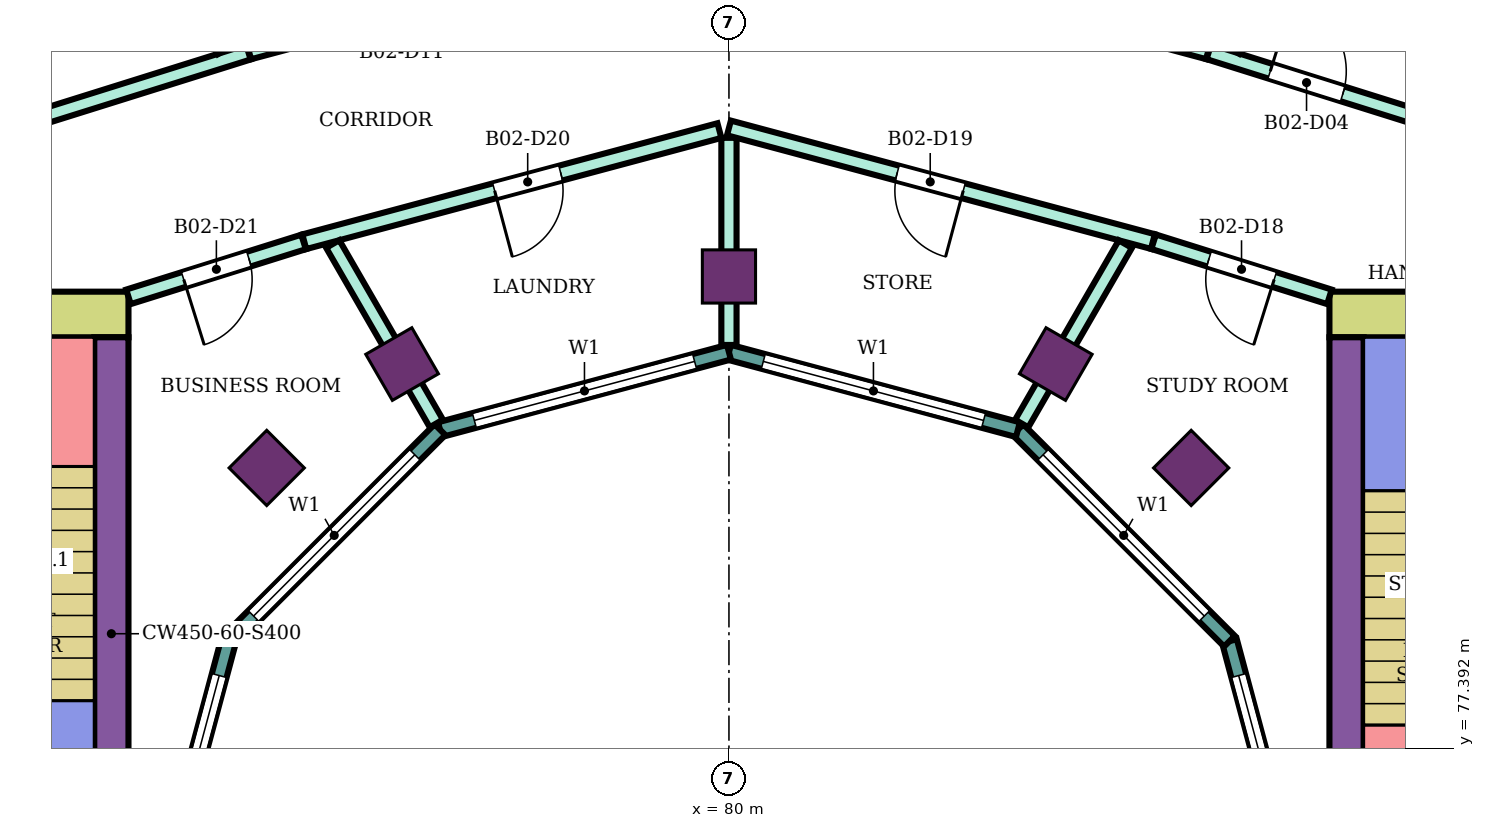
"""IFC4 building model, lengths in metres.
Left out: names, types, materials, properties, quantities, classifications, styles, units other than length and angle.
Written with IfcOpenShell. Run it as: python <this file> out.ifc"""

import sys

from ifc_helpers import new_model, si_unit, direction, frame, frame_2d, origin, origin_2d, place, context, subcontext, project, spatial, rectangle, extrude, element, fill, save


model = new_model("IFC4")
c1 = context("Model", 3, precision=1e-05, world=origin(), true_north=direction((0.0, 1.0)))
c2 = subcontext(c1, "Body", "Model", "MODEL_VIEW")
j1 = project(units=[si_unit("LENGTHUNIT", "METRE"), si_unit("PLANEANGLEUNIT", "RADIAN")], contexts=[c1])
p1 = place(None, origin())
s1 = spatial("IfcSite", under=j1, at=p1, CompositionType="ELEMENT")
p2 = place(p1, origin())
s2 = spatial("IfcBuilding", under=s1, at=p2, CompositionType="ELEMENT")
p3 = place(p2, frame((0.0, 0.0, 225.1)))
s3 = spatial("IfcBuildingStorey", under=s2, at=p3, CompositionType="ELEMENT", Elevation=225.1)
for number, where, z_axis, x_axis in (
    (1, (86.081, 81.081, 0.0), (0.0, 0.0, 1.0), (0.707, 0.707, 0.0)),
    (2, (84.3, 82.448, 0.0), (0.0, 0.0, 1.0), (0.5, 0.866, 0.0)),
    (3, (80.0, 83.6, 0.0), (0.0, 0.0, 1.0), (0.0, 1.0, 0.0)),
    (4, (75.7, 82.448, 0.0), (0.0, 0.0, 1.0), (-0.5, 0.866, 0.0)),
    (5, (73.919, 81.081, 0.0), (0.0, 0.0, 1.0), (-0.707, 0.707, 0.0)),
):
    element("IfcColumn", number, at=place(p3, frame(where, z_axis=z_axis, x_axis=x_axis)), inside=s3, PredefinedType="COLUMN", context=c2, shape_type="SweptSolid", body=[
        extrude(rectangle(XDim=0.7, YDim=0.7, at=origin_2d()), origin(), (0.0, 0.0, 1.0), 4.2),
    ])
p4 = place(p3, frame((87.9, 83.1, 0.0), z_axis=(0.0, 0.0, 1.0), x_axis=(1.0, 0.0, 0.0)))
e6 = element("IfcWall", 6, at=p4, inside=s3, PredefinedType="SHEAR", context=c2, shape_type="SweptSolid", body=[
    extrude(rectangle(XDim=14.9, YDim=0.6, at=frame_2d((7.45, 0.0))), origin(), (0.0, 0.0, 1.0), 3.8),
])
p5 = place(p4, frame((4.2, 0.0, 0.0)))
e7 = element("IfcOpeningElement", 7, at=p5, cuts=e6, PredefinedType="OPENING", context=c2, shape_type="SweptSolid", body=[
    extrude(rectangle(XDim=2.4, YDim=2.4, at=frame_2d((1.2, 1.2))), frame((0.0, 0.31, 0.0), z_axis=(0.0, -1.0, 0.0), x_axis=(1.0, 0.0, 0.0)), (0.0, 0.0, 1.0), 0.62),
])
p6 = place(p3, frame((88.125, 75.0, 0.0), z_axis=(0.0, 0.0, 1.0), x_axis=(0.0, 1.0, 0.0)))
e8 = element("IfcWall", 8, at=p6, inside=s3, PredefinedType="SHEAR", context=c2, shape_type="SweptSolid", body=[
    extrude(rectangle(XDim=7.8, YDim=0.45, at=frame_2d((3.9, 0.0))), origin(), (0.0, 0.0, 1.0), 3.8),
])
p7 = place(p3, frame((72.1, 83.1, 0.0), z_axis=(0.0, 0.0, 1.0), x_axis=(-1.0, 0.0, 0.0)))
e9 = element("IfcWall", 9, at=p7, inside=s3, PredefinedType="SHEAR", context=c2, shape_type="SweptSolid", body=[
    extrude(rectangle(XDim=14.9, YDim=0.6, at=frame_2d((7.45, 0.0))), origin(), (0.0, 0.0, 1.0), 3.8),
])
p8 = place(p7, frame((4.2, 0.0, 0.0)))
e10 = element("IfcOpeningElement", 10, at=p8, cuts=e9, PredefinedType="OPENING", context=c2, shape_type="SweptSolid", body=[
    extrude(rectangle(XDim=2.4, YDim=2.4, at=frame_2d((1.2, 1.2))), frame((0.0, 0.31, 0.0), z_axis=(0.0, -1.0, 0.0), x_axis=(1.0, 0.0, 0.0)), (0.0, 0.0, 1.0), 0.62),
])
p9 = place(p3, frame((71.875, 82.8, 0.0), z_axis=(0.0, 0.0, 1.0), x_axis=(0.0, -1.0, 0.0)))
e11 = element("IfcWall", 11, at=p9, inside=s3, PredefinedType="SHEAR", context=c2, shape_type="SweptSolid", body=[
    extrude(rectangle(XDim=7.8, YDim=0.45, at=frame_2d((3.9, 0.0))), origin(), (0.0, 0.0, 1.0), 3.8),
])
p10 = place(p3, frame((87.604, 75.0, 0.0), z_axis=(0.0, 0.0, 1.0), x_axis=(-0.258789828301, 0.965933654434, 0.0)))
e12 = element("IfcWall", 12, at=p10, inside=s3, PredefinedType="NOTDEFINED", context=c2, shape_type="SweptSolid", body=[
    extrude(rectangle(XDim=3.936, YDim=0.2, at=frame_2d((1.968, 0.0))), origin(), (0.0, 0.0, 1.0), 4.2),
])
p11 = place(p10, frame((0.468, 0.0, 0.9)))
e13 = element("IfcOpeningElement", 13, at=p11, cuts=e12, PredefinedType="OPENING", context=c2, shape_type="SweptSolid", body=[
    extrude(rectangle(XDim=3.0, YDim=2.3, at=frame_2d((1.5, 1.15))), frame((0.0, 0.11, 0.0), z_axis=(0.0, -1.0, 0.0), x_axis=(1.0, 0.0, 0.0)), (0.0, 0.0, 1.0), 0.22),
])
p12 = place(p3, frame((86.585, 78.802, 0.0), z_axis=(0.0, 0.0, 1.0), x_axis=(-0.707106781187, 0.707106781187, 0.0)))
e14 = element("IfcWall", 14, at=p12, inside=s3, PredefinedType="NOTDEFINED", context=c2, shape_type="SweptSolid", body=[
    extrude(rectangle(XDim=3.936, YDim=0.2, at=frame_2d((1.968, 0.0))), origin(), (0.0, 0.0, 1.0), 4.2),
])
p13 = place(p12, frame((0.468, 0.0, 0.9)))
e15 = element("IfcOpeningElement", 15, at=p13, cuts=e14, PredefinedType="OPENING", context=c2, shape_type="SweptSolid", body=[
    extrude(rectangle(XDim=3.0, YDim=2.3, at=frame_2d((1.5, 1.15))), frame((0.0, 0.11, 0.0), z_axis=(0.0, -1.0, 0.0), x_axis=(1.0, 0.0, 0.0)), (0.0, 0.0, 1.0), 0.22),
])
p14 = place(p3, frame((83.802, 81.585, 0.0), z_axis=(0.0, 0.0, 1.0), x_axis=(-0.965933654434, 0.258789828301, 0.0)))
e16 = element("IfcWall", 16, at=p14, inside=s3, PredefinedType="NOTDEFINED", context=c2, shape_type="SweptSolid", body=[
    extrude(rectangle(XDim=3.936, YDim=0.2, at=frame_2d((1.968, 0.0))), origin(), (0.0, 0.0, 1.0), 4.2),
])
p15 = place(p14, frame((0.468, 0.0, 0.9)))
e17 = element("IfcOpeningElement", 17, at=p15, cuts=e16, PredefinedType="OPENING", context=c2, shape_type="SweptSolid", body=[
    extrude(rectangle(XDim=3.0, YDim=2.3, at=frame_2d((1.5, 1.15))), frame((0.0, 0.11, 0.0), z_axis=(0.0, -1.0, 0.0), x_axis=(1.0, 0.0, 0.0)), (0.0, 0.0, 1.0), 0.22),
])
p16 = place(p3, frame((80.0, 82.604, 0.0), z_axis=(0.0, 0.0, 1.0), x_axis=(-0.965933654434, -0.258789828301, 0.0)))
e18 = element("IfcWall", 18, at=p16, inside=s3, PredefinedType="NOTDEFINED", context=c2, shape_type="SweptSolid", body=[
    extrude(rectangle(XDim=3.936, YDim=0.2, at=frame_2d((1.968, 0.0))), origin(), (0.0, 0.0, 1.0), 4.2),
])
p17 = place(p16, frame((0.468, 0.0, 0.9)))
e19 = element("IfcOpeningElement", 19, at=p17, cuts=e18, PredefinedType="OPENING", context=c2, shape_type="SweptSolid", body=[
    extrude(rectangle(XDim=3.0, YDim=2.3, at=frame_2d((1.5, 1.15))), frame((0.0, 0.11, 0.0), z_axis=(0.0, -1.0, 0.0), x_axis=(1.0, 0.0, 0.0)), (0.0, 0.0, 1.0), 0.22),
])
p18 = place(p3, frame((76.198, 81.585, 0.0), z_axis=(0.0, 0.0, 1.0), x_axis=(-0.707106781187, -0.707106781187, 0.0)))
e20 = element("IfcWall", 20, at=p18, inside=s3, PredefinedType="NOTDEFINED", context=c2, shape_type="SweptSolid", body=[
    extrude(rectangle(XDim=3.936, YDim=0.2, at=frame_2d((1.968, 0.0))), origin(), (0.0, 0.0, 1.0), 4.2),
])
p19 = place(p18, frame((0.468, 0.0, 0.9)))
e21 = element("IfcOpeningElement", 21, at=p19, cuts=e20, PredefinedType="OPENING", context=c2, shape_type="SweptSolid", body=[
    extrude(rectangle(XDim=3.0, YDim=2.3, at=frame_2d((1.5, 1.15))), frame((0.0, 0.11, 0.0), z_axis=(0.0, -1.0, 0.0), x_axis=(1.0, 0.0, 0.0)), (0.0, 0.0, 1.0), 0.22),
])
p20 = place(p3, frame((73.415, 78.802, 0.0), z_axis=(0.0, 0.0, 1.0), x_axis=(-0.258789828301, -0.965933654434, 0.0)))
e22 = element("IfcWall", 22, at=p20, inside=s3, PredefinedType="NOTDEFINED", context=c2, shape_type="SweptSolid", body=[
    extrude(rectangle(XDim=3.936, YDim=0.2, at=frame_2d((1.968, 0.0))), origin(), (0.0, 0.0, 1.0), 4.2),
])
p21 = place(p20, frame((0.468, 0.0, 0.9)))
e23 = element("IfcOpeningElement", 23, at=p21, cuts=e22, PredefinedType="OPENING", context=c2, shape_type="SweptSolid", body=[
    extrude(rectangle(XDim=3.0, YDim=2.3, at=frame_2d((1.5, 1.15))), frame((0.0, 0.11, 0.0), z_axis=(0.0, -1.0, 0.0), x_axis=(1.0, 0.0, 0.0)), (0.0, 0.0, 1.0), 0.22),
])
p22 = place(p3, frame((68.2, 84.834, 0.0), z_axis=(0.0, 0.0, 1.0), x_axis=(0.954260265251, 0.298977166624, 0.0)))
e24 = element("IfcWall", 24, at=p22, inside=s3, PredefinedType="PARTITIONING", context=c2, shape_type="SweptSolid", body=[
    extrude(rectangle(XDim=5.741, YDim=0.2, at=frame_2d((2.87, 0.0))), origin(), (0.0, 0.0, 1.0), 3.75),
])
p23 = place(p3, frame((72.1, 83.332, 0.0), z_axis=(0.0, 0.0, 1.0), x_axis=(0.954233106619, 0.299063836383, 0.0)))
e25 = element("IfcWall", 25, at=p23, inside=s3, PredefinedType="PARTITIONING", context=c2, shape_type="SweptSolid", body=[
    extrude(rectangle(XDim=2.414, YDim=0.2, at=frame_2d((1.207, 0.0))), origin(), (0.0, 0.0, 1.0), 3.75),
])
p24 = place(p23, frame((0.762, 0.0, 0.0)))
e26 = element("IfcOpeningElement", 26, at=p24, cuts=e25, PredefinedType="OPENING", context=c2, shape_type="SweptSolid", body=[
    extrude(rectangle(XDim=0.9, YDim=2.1, at=frame_2d((0.45, 1.05))), frame((0.0, 0.11, 0.0), z_axis=(0.0, -1.0, 0.0), x_axis=(1.0, 0.0, 0.0)), (0.0, 0.0, 1.0), 0.22),
])
p25 = place(p3, frame((73.687, 86.554, 0.0), z_axis=(0.0, 0.0, 1.0), x_axis=(0.96595258731, 0.258719150952, 0.0)))
e27 = element("IfcWall", 27, at=p25, inside=s3, PredefinedType="PARTITIONING", context=c2, shape_type="SweptSolid", body=[
    extrude(rectangle(XDim=6.486, YDim=0.2, at=frame_2d((3.243, 0.0))), origin(), (0.0, 0.0, 1.0), 3.75),
])
p26 = place(p25, frame((1.578, 0.0, 0.0)))
e28 = element("IfcOpeningElement", 28, at=p26, cuts=e27, PredefinedType="OPENING", context=c2, shape_type="SweptSolid", body=[
    extrude(rectangle(XDim=1.0, YDim=2.1, at=frame_2d((0.5, 1.05))), frame((0.0, 0.11, 0.0), z_axis=(0.0, -1.0, 0.0), x_axis=(1.0, 0.0, 0.0)), (0.0, 0.0, 1.0), 0.22),
])
p27 = place(p3, frame((74.413, 84.057, 0.0), z_axis=(0.0, 0.0, 1.0), x_axis=(0.965972135939, 0.258646153246, 0.0)))
e29 = element("IfcWall", 29, at=p27, inside=s3, PredefinedType="PARTITIONING", context=c2, shape_type="SweptSolid", body=[
    extrude(rectangle(XDim=5.654, YDim=0.2, at=frame_2d((2.827, 0.0))), origin(), (0.0, 0.0, 1.0), 3.75),
])
p28 = place(p27, frame((2.593, 0.0, 0.0)))
e30 = element("IfcOpeningElement", 30, at=p28, cuts=e29, PredefinedType="OPENING", context=c2, shape_type="SweptSolid", body=[
    extrude(rectangle(XDim=0.9, YDim=2.1, at=frame_2d((0.45, 1.05))), frame((0.0, 0.11, 0.0), z_axis=(0.0, -1.0, 0.0), x_axis=(1.0, 0.0, 0.0)), (0.0, 0.0, 1.0), 0.22),
])
p29 = place(p3, frame((74.787, 84.027, 0.0), z_axis=(0.0, 0.0, 1.0), x_axis=(0.500079107518, -0.86597972622, 0.0)))
e31 = element("IfcWall", 31, at=p29, inside=s3, PredefinedType="PARTITIONING", context=c2, shape_type="SweptSolid", body=[
    extrude(rectangle(XDim=2.726, YDim=0.2, at=frame_2d((1.363, 0.0))), origin(), (0.0, 0.0, 1.0), 3.75),
])
p30 = place(p3, frame((80.0, 82.699, 0.0), z_axis=(0.0, 0.0, 1.0), x_axis=(0.0, 1.0, 0.0)))
e32 = element("IfcWall", 32, at=p30, inside=s3, PredefinedType="PARTITIONING", context=c2, shape_type="SweptSolid", body=[
    extrude(rectangle(XDim=2.725, YDim=0.2, at=frame_2d((1.363, 0.0))), origin(), (0.0, 0.0, 1.0), 3.75),
])
p31 = place(p3, frame((80.0, 85.554, 0.0), z_axis=(0.0, 0.0, 1.0), x_axis=(0.965928989968, -0.258807237802, 0.0)))
e33 = element("IfcWall", 33, at=p31, inside=s3, PredefinedType="PARTITIONING", context=c2, shape_type="SweptSolid", body=[
    extrude(rectangle(XDim=5.774, YDim=0.2, at=frame_2d((2.887, 0.0))), origin(), (0.0, 0.0, 1.0), 3.75),
])
p32 = place(p31, frame((2.292, 0.0, 0.0)))
e34 = element("IfcOpeningElement", 34, at=p32, cuts=e33, PredefinedType="OPENING", context=c2, shape_type="SweptSolid", body=[
    extrude(rectangle(XDim=0.9, YDim=2.1, at=frame_2d((0.45, 1.05))), frame((0.0, 0.11, 0.0), z_axis=(0.0, -1.0, 0.0), x_axis=(1.0, 0.0, 0.0)), (0.0, 0.0, 1.0), 0.22),
])
p33 = place(p3, frame((80.048, 88.233, 0.0), z_axis=(0.0, 0.0, 1.0), x_axis=(0.965865387308, -0.259044501198, 0.0)))
e35 = element("IfcWall", 35, at=p33, inside=s3, PredefinedType="PARTITIONING", context=c2, shape_type="SweptSolid", body=[
    extrude(rectangle(XDim=6.476, YDim=0.2, at=frame_2d((3.238, 0.0))), origin(), (0.0, 0.0, 1.0), 3.75),
])
p34 = place(p33, frame((0.5, 0.0, 0.0)))
e36 = element("IfcOpeningElement", 36, at=p34, cuts=e35, PredefinedType="OPENING", context=c2, shape_type="SweptSolid", body=[
    extrude(rectangle(XDim=1.0, YDim=2.1, at=frame_2d((0.5, 1.05))), frame((0.0, 0.11, 0.0), z_axis=(0.0, -1.0, 0.0), x_axis=(1.0, 0.0, 0.0)), (0.0, 0.0, 1.0), 0.22),
])
p35 = place(p3, frame((83.852, 81.665, 0.0), z_axis=(0.0, 0.0, 1.0), x_axis=(0.500146274735, 0.865940935554, 0.0)))
e37 = element("IfcWall", 37, at=p35, inside=s3, PredefinedType="PARTITIONING", context=c2, shape_type="SweptSolid", body=[
    extrude(rectangle(XDim=2.726, YDim=0.2, at=frame_2d((1.363, 0.0))), origin(), (0.0, 0.0, 1.0), 3.75),
])
p36 = place(p3, frame((85.587, 84.057, 0.0), z_axis=(0.0, 0.0, 1.0), x_axis=(0.954239513179, -0.299043393987, 0.0)))
e38 = element("IfcWall", 38, at=p36, inside=s3, PredefinedType="PARTITIONING", context=c2, shape_type="SweptSolid", body=[
    extrude(rectangle(XDim=2.424, YDim=0.2, at=frame_2d((1.212, 0.0))), origin(), (0.0, 0.0, 1.0), 3.75),
])
p37 = place(p36, frame((0.762, 0.0, 0.0)))
e39 = element("IfcOpeningElement", 39, at=p37, cuts=e38, PredefinedType="OPENING", context=c2, shape_type="SweptSolid", body=[
    extrude(rectangle(XDim=0.9, YDim=2.1, at=frame_2d((0.45, 1.05))), frame((0.0, 0.11, 0.0), z_axis=(0.0, -1.0, 0.0), x_axis=(1.0, 0.0, 0.0)), (0.0, 0.0, 1.0), 0.22),
])
p38 = place(p3, frame((86.313, 86.554, 0.0), z_axis=(0.0, 0.0, 1.0), x_axis=(0.954081217458, -0.299548043717, 0.0)))
e40 = element("IfcWall", 40, at=p38, inside=s3, PredefinedType="PARTITIONING", context=c2, shape_type="SweptSolid", body=[
    extrude(rectangle(XDim=5.721, YDim=0.2, at=frame_2d((2.86, 0.0))), origin(), (0.0, 0.0, 1.0), 3.75),
])
p39 = place(p38, frame((0.848, 0.0, 0.0)))
e41 = element("IfcOpeningElement", 41, at=p39, cuts=e40, PredefinedType="OPENING", context=c2, shape_type="SweptSolid", body=[
    extrude(rectangle(XDim=1.0, YDim=2.1, at=frame_2d((0.5, 1.05))), frame((0.0, 0.11, 0.0), z_axis=(0.0, -1.0, 0.0), x_axis=(1.0, 0.0, 0.0)), (0.0, 0.0, 1.0), 0.22),
])
p40 = place(p3, frame((67.109, 97.346, 0.0), z_axis=(0.0, 0.0, 1.0), x_axis=(0.498583439824, -0.866841711925, 0.0)))
e42 = element("IfcWall", 42, at=p40, inside=s3, PredefinedType="PARTITIONING", context=c2, shape_type="SweptSolid", body=[
    extrude(rectangle(XDim=12.456, YDim=0.1, at=frame_2d((6.228, 0.0))), origin(), (0.0, 0.0, 1.0), 3.75),
])
p41 = place(p40, frame((2.538, 0.0, 0.0)))
e43 = element("IfcOpeningElement", 43, at=p41, cuts=e42, PredefinedType="OPENING", context=c2, shape_type="SweptSolid", body=[
    extrude(rectangle(XDim=0.9, YDim=2.1, at=frame_2d((0.45, 1.05))), frame((0.0, 0.06, 0.0), z_axis=(0.0, -1.0, 0.0), x_axis=(1.0, 0.0, 0.0)), (0.0, 0.0, 1.0), 0.12),
])
p42 = place(p40, frame((9.85, 0.0, 0.0)))
e44 = element("IfcOpeningElement", 44, at=p42, cuts=e42, PredefinedType="OPENING", context=c2, shape_type="SweptSolid", body=[
    extrude(rectangle(XDim=0.8, YDim=2.1, at=frame_2d((0.4, 1.05))), frame((0.0, 0.06, 0.0), z_axis=(0.0, -1.0, 0.0), x_axis=(1.0, 0.0, 0.0)), (0.0, 0.0, 1.0), 0.12),
])
p43 = place(p3, frame((86.671, 86.554, 0.0), z_axis=(0.0, 0.0, 1.0), x_axis=(0.500104188531, 0.865965242151, 0.0)))
e45 = element("IfcWall", 45, at=p43, inside=s3, PredefinedType="PARTITIONING", context=c2, shape_type="SweptSolid", body=[
    extrude(rectangle(XDim=12.456, YDim=0.1, at=frame_2d((6.228, 0.0))), origin(), (0.0, 0.0, 1.0), 3.75),
])
p44 = place(p43, frame((9.111, 0.0, 0.0)))
e46 = element("IfcOpeningElement", 46, at=p44, cuts=e45, PredefinedType="OPENING", context=c2, shape_type="SweptSolid", body=[
    extrude(rectangle(XDim=0.9, YDim=2.1, at=frame_2d((0.45, 1.05))), frame((0.0, 0.06, 0.0), z_axis=(0.0, -1.0, 0.0), x_axis=(1.0, 0.0, 0.0)), (0.0, 0.0, 1.0), 0.12),
])
p45 = place(p43, frame((2.462, 0.0, 0.0)))
e47 = element("IfcOpeningElement", 47, at=p45, cuts=e45, PredefinedType="OPENING", context=c2, shape_type="SweptSolid", body=[
    extrude(rectangle(XDim=0.8, YDim=2.1, at=frame_2d((0.4, 1.05))), frame((0.0, 0.06, 0.0), z_axis=(0.0, -1.0, 0.0), x_axis=(1.0, 0.0, 0.0)), (0.0, 0.0, 1.0), 0.12),
])
p46 = place(p11, origin())
e48 = element("IfcWindow", 48, at=p46, inside=s3, PartitioningType="SINGLE_PANEL", PredefinedType="WINDOW", context=c2, shape_type="SweptSolid", body=[
    extrude(rectangle(XDim=3.0, YDim=2.3, at=frame_2d((1.5, 1.15))), frame((0.0, 0.03, 0.0), z_axis=(0.0, -1.0, 0.0), x_axis=(1.0, 0.0, 0.0)), (0.0, 0.0, 1.0), 0.06),
])
fill(e13, e48)
p47 = place(p13, origin())
e49 = element("IfcWindow", 49, at=p47, inside=s3, PartitioningType="SINGLE_PANEL", PredefinedType="WINDOW", context=c2, shape_type="SweptSolid", body=[
    extrude(rectangle(XDim=3.0, YDim=2.3, at=frame_2d((1.5, 1.15))), frame((0.0, 0.03, 0.0), z_axis=(0.0, -1.0, 0.0), x_axis=(1.0, 0.0, 0.0)), (0.0, 0.0, 1.0), 0.06),
])
fill(e15, e49)
p48 = place(p15, origin())
e50 = element("IfcWindow", 50, at=p48, inside=s3, PartitioningType="SINGLE_PANEL", PredefinedType="WINDOW", context=c2, shape_type="SweptSolid", body=[
    extrude(rectangle(XDim=3.0, YDim=2.3, at=frame_2d((1.5, 1.15))), frame((0.0, 0.03, 0.0), z_axis=(0.0, -1.0, 0.0), x_axis=(1.0, 0.0, 0.0)), (0.0, 0.0, 1.0), 0.06),
])
fill(e17, e50)
p49 = place(p17, origin())
e51 = element("IfcWindow", 51, at=p49, inside=s3, PartitioningType="SINGLE_PANEL", PredefinedType="WINDOW", context=c2, shape_type="SweptSolid", body=[
    extrude(rectangle(XDim=3.0, YDim=2.3, at=frame_2d((1.5, 1.15))), frame((0.0, 0.03, 0.0), z_axis=(0.0, -1.0, 0.0), x_axis=(1.0, 0.0, 0.0)), (0.0, 0.0, 1.0), 0.06),
])
fill(e19, e51)
p50 = place(p19, origin())
e52 = element("IfcWindow", 52, at=p50, inside=s3, PartitioningType="SINGLE_PANEL", PredefinedType="WINDOW", context=c2, shape_type="SweptSolid", body=[
    extrude(rectangle(XDim=3.0, YDim=2.3, at=frame_2d((1.5, 1.15))), frame((0.0, 0.03, 0.0), z_axis=(0.0, -1.0, 0.0), x_axis=(1.0, 0.0, 0.0)), (0.0, 0.0, 1.0), 0.06),
])
fill(e21, e52)
p51 = place(p21, origin())
e53 = element("IfcWindow", 53, at=p51, inside=s3, PartitioningType="SINGLE_PANEL", PredefinedType="WINDOW", context=c2, shape_type="SweptSolid", body=[
    extrude(rectangle(XDim=3.0, YDim=2.3, at=frame_2d((1.5, 1.15))), frame((0.0, 0.03, 0.0), z_axis=(0.0, -1.0, 0.0), x_axis=(1.0, 0.0, 0.0)), (0.0, 0.0, 1.0), 0.06),
])
fill(e23, e53)
p52 = place(p39, origin())
e54 = element("IfcDoor", 54, at=p52, inside=s3, OperationType="SINGLE_SWING_LEFT", PredefinedType="DOOR", context=c2, shape_type="SweptSolid", body=[
    extrude(rectangle(XDim=1.0, YDim=2.1, at=frame_2d((0.5, 1.05))), frame((0.0, 0.025, 0.0), z_axis=(0.0, -1.0, 0.0), x_axis=(1.0, 0.0, 0.0)), (0.0, 0.0, 1.0), 0.05),
])
fill(e41, e54)
p53 = place(p37, frame((0.9, 0.0, 0.0), z_axis=(0.0, 0.0, 1.0), x_axis=(-1.0, 0.0, 0.0)))
e55 = element("IfcDoor", 55, at=p53, inside=s3, OperationType="SINGLE_SWING_LEFT", PredefinedType="DOOR", context=c2, shape_type="SweptSolid", body=[
    extrude(rectangle(XDim=0.9, YDim=2.1, at=frame_2d((0.45, 1.05))), frame((0.0, 0.025, 0.0), z_axis=(0.0, -1.0, 0.0), x_axis=(1.0, 0.0, 0.0)), (0.0, 0.0, 1.0), 0.05),
])
fill(e39, e55)
p54 = place(p32, frame((0.9, 0.0, 0.0), z_axis=(0.0, 0.0, 1.0), x_axis=(-1.0, 0.0, 0.0)))
e56 = element("IfcDoor", 56, at=p54, inside=s3, OperationType="SINGLE_SWING_LEFT", PredefinedType="DOOR", context=c2, shape_type="SweptSolid", body=[
    extrude(rectangle(XDim=0.9, YDim=2.1, at=frame_2d((0.45, 1.05))), frame((0.0, 0.025, 0.0), z_axis=(0.0, -1.0, 0.0), x_axis=(1.0, 0.0, 0.0)), (0.0, 0.0, 1.0), 0.05),
])
fill(e34, e56)
p55 = place(p28, frame((0.9, 0.0, 0.0), z_axis=(0.0, 0.0, 1.0), x_axis=(-1.0, 0.0, 0.0)))
e57 = element("IfcDoor", 57, at=p55, inside=s3, OperationType="SINGLE_SWING_RIGHT", PredefinedType="DOOR", context=c2, shape_type="SweptSolid", body=[
    extrude(rectangle(XDim=0.9, YDim=2.1, at=frame_2d((0.45, 1.05))), frame((0.0, 0.025, 0.0), z_axis=(0.0, -1.0, 0.0), x_axis=(1.0, 0.0, 0.0)), (0.0, 0.0, 1.0), 0.05),
])
fill(e30, e57)
p56 = place(p24, frame((0.9, 0.0, 0.0), z_axis=(0.0, 0.0, 1.0), x_axis=(-1.0, 0.0, 0.0)))
e58 = element("IfcDoor", 58, at=p56, inside=s3, OperationType="SINGLE_SWING_RIGHT", PredefinedType="DOOR", context=c2, shape_type="SweptSolid", body=[
    extrude(rectangle(XDim=0.9, YDim=2.1, at=frame_2d((0.45, 1.05))), frame((0.0, 0.025, 0.0), z_axis=(0.0, -1.0, 0.0), x_axis=(1.0, 0.0, 0.0)), (0.0, 0.0, 1.0), 0.05),
])
fill(e26, e58)
save(model, sys.argv[1])
